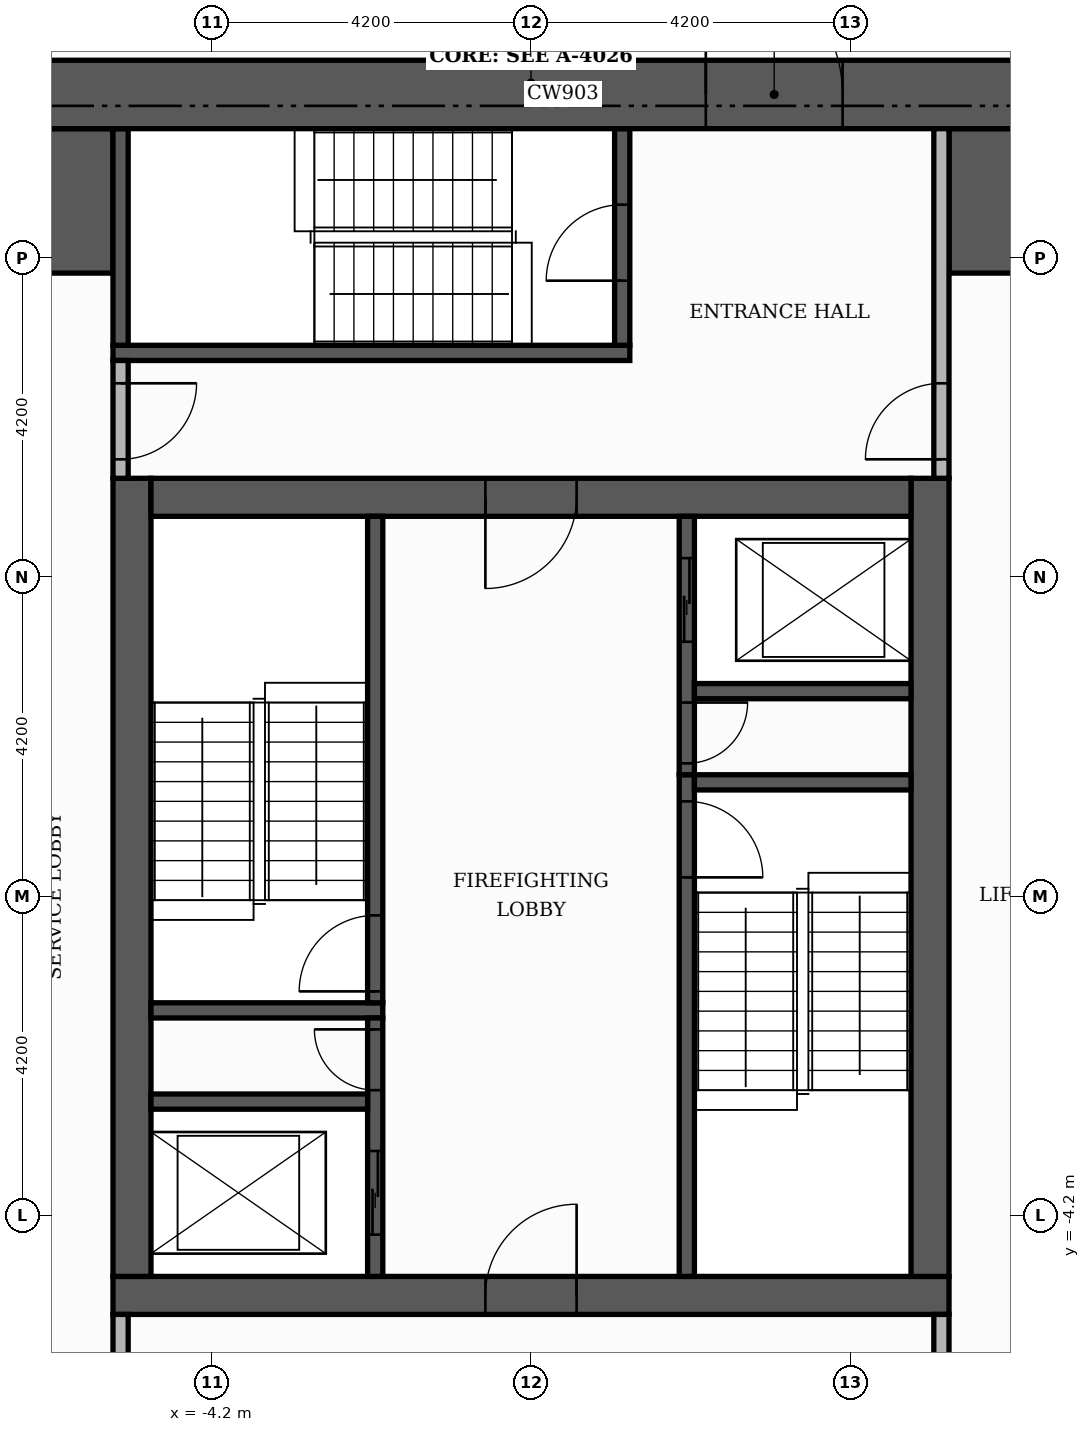
"""IFC4 building model, lengths in metres.
Left out: names, types, materials, properties, quantities, classifications, styles, units other than length and angle.
Written with IfcOpenShell. Run it as: python <this file> out.ifc"""

import sys

from ifc_helpers import new_model, si_unit, direction, frame, frame_2d, origin, place, context, subcontext, project, spatial, rectangle, extrude, element, fill, save


model = new_model("IFC4")
c1 = context("Model", 3, precision=1e-05, world=origin(), true_north=direction((0.0, 1.0)))
c2 = subcontext(c1, "Body", "Model", "MODEL_VIEW")
j1 = project(units=[si_unit("LENGTHUNIT", "METRE"), si_unit("PLANEANGLEUNIT", "RADIAN")], contexts=[c1])
p1 = place(None, origin())
s1 = spatial("IfcSite", under=j1, at=p1, CompositionType="ELEMENT")
p2 = place(p1, origin())
s2 = spatial("IfcBuilding", under=s1, at=p2, CompositionType="ELEMENT")
p3 = place(p2, frame((0.0, 0.0, 161.1)))
s3 = spatial("IfcBuildingStorey", under=s2, at=p3, CompositionType="ELEMENT", Elevation=161.1)
p4 = place(p3, frame((-5.5, -5.25, 0.0), z_axis=(0.0, 0.0, 1.0), x_axis=(1.0, 0.0, 0.0)))
e1 = element("IfcWall", 1, at=p4, inside=s3, PredefinedType="SHEAR", context=c2, shape_type="SweptSolid", body=[
    extrude(rectangle(XDim=11.0, YDim=0.5, at=frame_2d((5.5, 0.0))), origin(), (0.0, 0.0, 1.0), 3.48),
])
p5 = place(p4, frame((4.9, 0.0, 0.0)))
e2 = element("IfcOpeningElement", 2, at=p5, cuts=e1, PredefinedType="OPENING", context=c2, shape_type="SweptSolid", body=[
    extrude(rectangle(XDim=1.2, YDim=2.1, at=frame_2d((0.6, 1.05))), frame((0.0, 0.26, 0.0), z_axis=(0.0, -1.0, 0.0), x_axis=(1.0, 0.0, 0.0)), (0.0, 0.0, 1.0), 0.52),
])
for number, where, z_axis, x_axis in (
    (3, (-5.25, -5.0, 0.0), (0.0, 0.0, 1.0), (0.0, 1.0, 0.0)),
    (4, (5.25, -5.0, 0.0), (0.0, 0.0, 1.0), (0.0, 1.0, 0.0)),
):
    element("IfcWall", number, at=place(p3, frame(where, z_axis=z_axis, x_axis=x_axis)), inside=s3, PredefinedType="SHEAR", context=c2, shape_type="SweptSolid", body=[
        extrude(rectangle(XDim=10.5, YDim=0.5, at=frame_2d((5.25, 0.0))), origin(), (0.0, 0.0, 1.0), 3.48),
    ])
p6 = place(p3, frame((-5.0, 5.25, 0.0), z_axis=(0.0, 0.0, 1.0), x_axis=(1.0, 0.0, 0.0)))
e5 = element("IfcWall", 5, at=p6, inside=s3, PredefinedType="SHEAR", context=c2, shape_type="SweptSolid", body=[
    extrude(rectangle(XDim=10.0, YDim=0.5, at=frame_2d((5.0, 0.0))), origin(), (0.0, 0.0, 1.0), 3.48),
])
p7 = place(p6, frame((4.4, 0.0, 0.0)))
e6 = element("IfcOpeningElement", 6, at=p7, cuts=e5, PredefinedType="OPENING", context=c2, shape_type="SweptSolid", body=[
    extrude(rectangle(XDim=1.2, YDim=2.1, at=frame_2d((0.6, 1.05))), frame((0.0, 0.26, 0.0), z_axis=(0.0, -1.0, 0.0), x_axis=(1.0, 0.0, 0.0)), (0.0, 0.0, 1.0), 0.52),
])
for number, where, z_axis, x_axis in (
    (7, (-10.1, 9.15, 0.0), (0.0, 0.0, 1.0), (1.0, 0.0, 0.0)),
    (8, (5.5, 9.15, 0.0), (0.0, 0.0, 1.0), (1.0, 0.0, 0.0)),
):
    element("IfcWall", number, at=place(p3, frame(where, z_axis=z_axis, x_axis=x_axis)), inside=s3, PredefinedType="SHEAR", context=c2, shape_type="SweptSolid", body=[
        extrude(rectangle(XDim=4.6, YDim=1.9, at=frame_2d((2.3, 0.0))), origin(), (0.0, 0.0, 1.0), 3.48),
    ])
p8 = place(p3, frame((2.05, -5.0, 0.0), z_axis=(0.0, 0.0, 1.0), x_axis=(0.0, 1.0, 0.0)))
e9 = element("IfcWall", 9, at=p8, inside=s3, PredefinedType="SHEAR", context=c2, shape_type="SweptSolid", body=[
    extrude(rectangle(XDim=6.6, YDim=0.2, at=frame_2d((3.3, 0.0))), origin(), (0.0, 0.0, 1.0), 3.48),
])
p9 = place(p8, frame((5.25, 0.0, 0.0)))
e10 = element("IfcOpeningElement", 10, at=p9, cuts=e9, PredefinedType="OPENING", context=c2, shape_type="SweptSolid", body=[
    extrude(rectangle(XDim=1.0, YDim=2.1, at=frame_2d((0.5, 1.05))), frame((0.0, 0.11, 0.0), z_axis=(0.0, -1.0, 0.0), x_axis=(1.0, 0.0, 0.0)), (0.0, 0.0, 1.0), 0.22),
])
p10 = place(p3, frame((-5.0, -1.5, 0.0), z_axis=(0.0, 0.0, 1.0), x_axis=(1.0, 0.0, 0.0)))
e11 = element("IfcWall", 11, at=p10, inside=s3, PredefinedType="SHEAR", context=c2, shape_type="SweptSolid", body=[
    extrude(rectangle(XDim=3.05, YDim=0.2, at=frame_2d((1.525, 0.0))), origin(), (0.0, 0.0, 1.0), 3.48),
])
p11 = place(p3, frame((-2.05, -1.4, 0.0), z_axis=(0.0, 0.0, 1.0), x_axis=(0.0, 1.0, 0.0)))
e12 = element("IfcWall", 12, at=p11, inside=s3, PredefinedType="SHEAR", context=c2, shape_type="SweptSolid", body=[
    extrude(rectangle(XDim=6.4, YDim=0.2, at=frame_2d((3.2, 0.0))), origin(), (0.0, 0.0, 1.0), 3.48),
])
p12 = place(p11, frame((0.15, 0.0, 0.0)))
e13 = element("IfcOpeningElement", 13, at=p12, cuts=e12, PredefinedType="OPENING", context=c2, shape_type="SweptSolid", body=[
    extrude(rectangle(XDim=1.0, YDim=2.1, at=frame_2d((0.5, 1.05))), frame((0.0, 0.11, 0.0), z_axis=(0.0, -1.0, 0.0), x_axis=(1.0, 0.0, 0.0)), (0.0, 0.0, 1.0), 0.22),
])
p13 = place(p3, frame((2.15, 1.5, 0.0), z_axis=(0.0, 0.0, 1.0), x_axis=(1.0, 0.0, 0.0)))
e14 = element("IfcWall", 14, at=p13, inside=s3, PredefinedType="SHEAR", context=c2, shape_type="SweptSolid", body=[
    extrude(rectangle(XDim=2.85, YDim=0.2, at=frame_2d((1.425, 0.0))), origin(), (0.0, 0.0, 1.0), 3.48),
])
p14 = place(p3, frame((-5.5, 7.15, 0.0), z_axis=(0.0, 0.0, 1.0), x_axis=(1.0, 0.0, 0.0)))
e15 = element("IfcWall", 15, at=p14, inside=s3, PredefinedType="SHEAR", context=c2, shape_type="SweptSolid", body=[
    extrude(rectangle(XDim=6.8, YDim=0.2, at=frame_2d((3.4, 0.0))), origin(), (0.0, 0.0, 1.0), 3.48),
])
p15 = place(p3, frame((-5.4, 7.25, 0.0), z_axis=(0.0, 0.0, 1.0), x_axis=(0.0, 1.0, 0.0)))
e16 = element("IfcWall", 16, at=p15, inside=s3, PredefinedType="SHEAR", context=c2, shape_type="SweptSolid", body=[
    extrude(rectangle(XDim=2.85, YDim=0.2, at=frame_2d((1.425, 0.0))), origin(), (0.0, 0.0, 1.0), 3.48),
])
p16 = place(p3, frame((1.2, 7.25, 0.0), z_axis=(0.0, 0.0, 1.0), x_axis=(0.0, 1.0, 0.0)))
e17 = element("IfcWall", 17, at=p16, inside=s3, PredefinedType="SHEAR", context=c2, shape_type="SweptSolid", body=[
    extrude(rectangle(XDim=2.85, YDim=0.2, at=frame_2d((1.425, 0.0))), origin(), (0.0, 0.0, 1.0), 3.48),
])
p17 = place(p16, frame((0.85, 0.0, 0.0)))
e18 = element("IfcOpeningElement", 18, at=p17, cuts=e17, PredefinedType="OPENING", context=c2, shape_type="SweptSolid", body=[
    extrude(rectangle(XDim=1.0, YDim=2.1, at=frame_2d((0.5, 1.05))), frame((0.0, 0.11, 0.0), z_axis=(0.0, -1.0, 0.0), x_axis=(1.0, 0.0, 0.0)), (0.0, 0.0, 1.0), 0.22),
])
p18 = place(p3, frame((-2.05, -5.0, 0.0), z_axis=(0.0, 0.0, 1.0), x_axis=(0.0, 1.0, 0.0)))
e19 = element("IfcWall", 19, at=p18, inside=s3, PredefinedType="SHEAR", context=c2, shape_type="SweptSolid", body=[
    extrude(rectangle(XDim=3.4, YDim=0.2, at=frame_2d((1.7, 0.0))), origin(), (0.0, 0.0, 1.0), 3.48),
])
p19 = place(p18, frame((0.55, 0.0, 0.0)))
e20 = element("IfcOpeningElement", 20, at=p19, cuts=e19, PredefinedType="OPENING", context=c2, shape_type="SweptSolid", body=[
    extrude(rectangle(XDim=1.1, YDim=2.1, at=frame_2d((0.55, 1.05))), frame((0.0, 0.11, 0.0), z_axis=(0.0, -1.0, 0.0), x_axis=(1.0, 0.0, 0.0)), (0.0, 0.0, 1.0), 0.22),
])
p20 = place(p18, frame((2.45, 0.0, 0.0)))
e21 = element("IfcOpeningElement", 21, at=p20, cuts=e19, PredefinedType="OPENING", context=c2, shape_type="SweptSolid", body=[
    extrude(rectangle(XDim=0.8, YDim=2.1, at=frame_2d((0.4, 1.05))), frame((0.0, 0.11, 0.0), z_axis=(0.0, -1.0, 0.0), x_axis=(1.0, 0.0, 0.0)), (0.0, 0.0, 1.0), 0.22),
])
p21 = place(p3, frame((-5.0, -2.7, 0.0), z_axis=(0.0, 0.0, 1.0), x_axis=(1.0, 0.0, 0.0)))
e22 = element("IfcWall", 22, at=p21, inside=s3, PredefinedType="SHEAR", context=c2, shape_type="SweptSolid", body=[
    extrude(rectangle(XDim=2.85, YDim=0.2, at=frame_2d((1.425, 0.0))), origin(), (0.0, 0.0, 1.0), 3.48),
])
p22 = place(p3, frame((2.05, 1.6, 0.0), z_axis=(0.0, 0.0, 1.0), x_axis=(0.0, 1.0, 0.0)))
e23 = element("IfcWall", 23, at=p22, inside=s3, PredefinedType="SHEAR", context=c2, shape_type="SweptSolid", body=[
    extrude(rectangle(XDim=3.4, YDim=0.2, at=frame_2d((1.7, 0.0))), origin(), (0.0, 0.0, 1.0), 3.48),
])
p23 = place(p22, frame((1.75, 0.0, 0.0)))
e24 = element("IfcOpeningElement", 24, at=p23, cuts=e23, PredefinedType="OPENING", context=c2, shape_type="SweptSolid", body=[
    extrude(rectangle(XDim=1.1, YDim=2.1, at=frame_2d((0.55, 1.05))), frame((0.0, 0.11, 0.0), z_axis=(0.0, -1.0, 0.0), x_axis=(1.0, 0.0, 0.0)), (0.0, 0.0, 1.0), 0.22),
])
p24 = place(p22, frame((0.15, 0.0, 0.0)))
e25 = element("IfcOpeningElement", 25, at=p24, cuts=e23, PredefinedType="OPENING", context=c2, shape_type="SweptSolid", body=[
    extrude(rectangle(XDim=0.8, YDim=2.1, at=frame_2d((0.4, 1.05))), frame((0.0, 0.11, 0.0), z_axis=(0.0, -1.0, 0.0), x_axis=(1.0, 0.0, 0.0)), (0.0, 0.0, 1.0), 0.22),
])
p25 = place(p3, frame((2.15, 2.7, 0.0), z_axis=(0.0, 0.0, 1.0), x_axis=(1.0, 0.0, 0.0)))
e26 = element("IfcWall", 26, at=p25, inside=s3, PredefinedType="SHEAR", context=c2, shape_type="SweptSolid", body=[
    extrude(rectangle(XDim=2.85, YDim=0.2, at=frame_2d((1.425, 0.0))), origin(), (0.0, 0.0, 1.0), 3.48),
])
p26 = place(p3, frame((-11.0, 10.55, 0.0), z_axis=(0.0, 0.0, 1.0), x_axis=(1.0, 0.0, 0.0)))
e27 = element("IfcWall", 27, at=p26, inside=s3, PredefinedType="SHEAR", context=c2, shape_type="SweptSolid", body=[
    extrude(rectangle(XDim=22.0, YDim=0.9, at=frame_2d((11.0, 0.0))), origin(), (0.0, 0.0, 1.0), 3.48),
])
p27 = place(p26, frame((13.3, 0.0, 0.0)))
e28 = element("IfcOpeningElement", 28, at=p27, cuts=e27, PredefinedType="OPENING", context=c2, shape_type="SweptSolid", body=[
    extrude(rectangle(XDim=1.8, YDim=2.2, at=frame_2d((0.9, 1.1))), frame((0.0, 0.46, 0.0), z_axis=(0.0, -1.0, 0.0), x_axis=(1.0, 0.0, 0.0)), (0.0, 0.0, 1.0), 0.92),
])
p28 = place(p3, frame((-5.4, -10.1, 0.0), z_axis=(0.0, 0.0, 1.0), x_axis=(0.0, 1.0, 0.0)))
e29 = element("IfcWall", 29, at=p28, inside=s3, PredefinedType="PARTITIONING", context=c2, shape_type="SweptSolid", body=[
    extrude(rectangle(XDim=4.6, YDim=0.2, at=frame_2d((2.3, 0.0))), origin(), (0.0, 0.0, 1.0), 3.48),
])
p29 = place(p28, frame((2.9, 0.0, 0.0)))
e30 = element("IfcOpeningElement", 30, at=p29, cuts=e29, PredefinedType="OPENING", context=c2, shape_type="SweptSolid", body=[
    extrude(rectangle(XDim=1.0, YDim=2.1, at=frame_2d((0.5, 1.05))), frame((0.0, 0.11, 0.0), z_axis=(0.0, -1.0, 0.0), x_axis=(1.0, 0.0, 0.0)), (0.0, 0.0, 1.0), 0.22),
])
p30 = place(p3, frame((5.4, -10.1, 0.0), z_axis=(0.0, 0.0, 1.0), x_axis=(0.0, 1.0, 0.0)))
e31 = element("IfcWall", 31, at=p30, inside=s3, PredefinedType="PARTITIONING", context=c2, shape_type="SweptSolid", body=[
    extrude(rectangle(XDim=4.6, YDim=0.2, at=frame_2d((2.3, 0.0))), origin(), (0.0, 0.0, 1.0), 3.48),
])
p31 = place(p30, frame((2.9, 0.0, 0.0)))
e32 = element("IfcOpeningElement", 32, at=p31, cuts=e31, PredefinedType="OPENING", context=c2, shape_type="SweptSolid", body=[
    extrude(rectangle(XDim=1.0, YDim=2.1, at=frame_2d((0.5, 1.05))), frame((0.0, 0.11, 0.0), z_axis=(0.0, -1.0, 0.0), x_axis=(1.0, 0.0, 0.0)), (0.0, 0.0, 1.0), 0.22),
])
p32 = place(p3, frame((-5.4, 5.5, 0.0), z_axis=(0.0, 0.0, 1.0), x_axis=(0.0, 1.0, 0.0)))
e33 = element("IfcWall", 33, at=p32, inside=s3, PredefinedType="PARTITIONING", context=c2, shape_type="SweptSolid", body=[
    extrude(rectangle(XDim=1.55, YDim=0.2, at=frame_2d((0.775, 0.0))), origin(), (0.0, 0.0, 1.0), 3.48),
])
p33 = place(p32, frame((0.25, 0.0, 0.0)))
e34 = element("IfcOpeningElement", 34, at=p33, cuts=e33, PredefinedType="OPENING", context=c2, shape_type="SweptSolid", body=[
    extrude(rectangle(XDim=1.0, YDim=2.1, at=frame_2d((0.5, 1.05))), frame((0.0, 0.11, 0.0), z_axis=(0.0, -1.0, 0.0), x_axis=(1.0, 0.0, 0.0)), (0.0, 0.0, 1.0), 0.22),
])
p34 = place(p3, frame((5.4, 5.5, 0.0), z_axis=(0.0, 0.0, 1.0), x_axis=(0.0, 1.0, 0.0)))
e35 = element("IfcWall", 35, at=p34, inside=s3, PredefinedType="PARTITIONING", context=c2, shape_type="SweptSolid", body=[
    extrude(rectangle(XDim=4.6, YDim=0.2, at=frame_2d((2.3, 0.0))), origin(), (0.0, 0.0, 1.0), 3.48),
])
p35 = place(p34, frame((0.25, 0.0, 0.0)))
e36 = element("IfcOpeningElement", 36, at=p35, cuts=e35, PredefinedType="OPENING", context=c2, shape_type="SweptSolid", body=[
    extrude(rectangle(XDim=1.0, YDim=2.1, at=frame_2d((0.5, 1.05))), frame((0.0, 0.11, 0.0), z_axis=(0.0, -1.0, 0.0), x_axis=(1.0, 0.0, 0.0)), (0.0, 0.0, 1.0), 0.22),
])
p36 = place(p23, origin())
e37 = element("IfcDoor", 37, at=p36, inside=s3, OperationType="SLIDING_TO_LEFT", PredefinedType="DOOR", context=c2, shape_type="SweptSolid", body=[
    extrude(rectangle(XDim=1.1, YDim=2.1, at=frame_2d((0.55, 1.05))), frame((0.0, 0.025, 0.0), z_axis=(0.0, -1.0, 0.0), x_axis=(1.0, 0.0, 0.0)), (0.0, 0.0, 1.0), 0.05),
])
fill(e24, e37)
p37 = place(p19, origin())
e38 = element("IfcDoor", 38, at=p37, inside=s3, OperationType="SLIDING_TO_LEFT", PredefinedType="DOOR", context=c2, shape_type="SweptSolid", body=[
    extrude(rectangle(XDim=1.1, YDim=2.1, at=frame_2d((0.55, 1.05))), frame((0.0, 0.025, 0.0), z_axis=(0.0, -1.0, 0.0), x_axis=(1.0, 0.0, 0.0)), (0.0, 0.0, 1.0), 0.05),
])
fill(e20, e38)
p38 = place(p12, origin())
e39 = element("IfcDoor", 39, at=p38, inside=s3, OperationType="SINGLE_SWING_LEFT", PredefinedType="DOOR", context=c2, shape_type="SweptSolid", body=[
    extrude(rectangle(XDim=1.0, YDim=2.1, at=frame_2d((0.5, 1.05))), frame((0.0, 0.025, 0.0), z_axis=(0.0, -1.0, 0.0), x_axis=(1.0, 0.0, 0.0)), (0.0, 0.0, 1.0), 0.05),
])
fill(e13, e39)
p39 = place(p9, frame((1.0, 0.0, 0.0), z_axis=(0.0, 0.0, 1.0), x_axis=(-1.0, 0.0, 0.0)))
e40 = element("IfcDoor", 40, at=p39, inside=s3, OperationType="SINGLE_SWING_LEFT", PredefinedType="DOOR", context=c2, shape_type="SweptSolid", body=[
    extrude(rectangle(XDim=1.0, YDim=2.1, at=frame_2d((0.5, 1.05))), frame((0.0, 0.025, 0.0), z_axis=(0.0, -1.0, 0.0), x_axis=(1.0, 0.0, 0.0)), (0.0, 0.0, 1.0), 0.05),
])
fill(e10, e40)
p40 = place(p24, frame((0.8, 0.0, 0.0), z_axis=(0.0, 0.0, 1.0), x_axis=(-1.0, 0.0, 0.0)))
e41 = element("IfcDoor", 41, at=p40, inside=s3, OperationType="SINGLE_SWING_RIGHT", PredefinedType="DOOR", context=c2, shape_type="SweptSolid", body=[
    extrude(rectangle(XDim=0.8, YDim=2.1, at=frame_2d((0.4, 1.05))), frame((0.0, 0.025, 0.0), z_axis=(0.0, -1.0, 0.0), x_axis=(1.0, 0.0, 0.0)), (0.0, 0.0, 1.0), 0.05),
])
fill(e25, e41)
p41 = place(p20, origin())
e42 = element("IfcDoor", 42, at=p41, inside=s3, OperationType="SINGLE_SWING_RIGHT", PredefinedType="DOOR", context=c2, shape_type="SweptSolid", body=[
    extrude(rectangle(XDim=0.8, YDim=2.1, at=frame_2d((0.4, 1.05))), frame((0.0, 0.025, 0.0), z_axis=(0.0, -1.0, 0.0), x_axis=(1.0, 0.0, 0.0)), (0.0, 0.0, 1.0), 0.05),
])
fill(e21, e42)
p42 = place(p7, frame((1.2, 0.0, 0.0), z_axis=(0.0, 0.0, 1.0), x_axis=(-1.0, 0.0, 0.0)))
e43 = element("IfcDoor", 43, at=p42, inside=s3, OperationType="SINGLE_SWING_LEFT", PredefinedType="DOOR", context=c2, shape_type="SweptSolid", body=[
    extrude(rectangle(XDim=1.2, YDim=2.1, at=frame_2d((0.6, 1.05))), frame((0.0, 0.025, 0.0), z_axis=(0.0, -1.0, 0.0), x_axis=(1.0, 0.0, 0.0)), (0.0, 0.0, 1.0), 0.05),
])
fill(e6, e43)
p43 = place(p5, origin())
e44 = element("IfcDoor", 44, at=p43, inside=s3, OperationType="SINGLE_SWING_RIGHT", PredefinedType="DOOR", context=c2, shape_type="SweptSolid", body=[
    extrude(rectangle(XDim=1.2, YDim=2.1, at=frame_2d((0.6, 1.05))), frame((0.0, 0.025, 0.0), z_axis=(0.0, -1.0, 0.0), x_axis=(1.0, 0.0, 0.0)), (0.0, 0.0, 1.0), 0.05),
])
fill(e2, e44)
p44 = place(p17, origin())
e45 = element("IfcDoor", 45, at=p44, inside=s3, OperationType="SINGLE_SWING_LEFT", PredefinedType="DOOR", context=c2, shape_type="SweptSolid", body=[
    extrude(rectangle(XDim=1.0, YDim=2.1, at=frame_2d((0.5, 1.05))), frame((0.0, 0.025, 0.0), z_axis=(0.0, -1.0, 0.0), x_axis=(1.0, 0.0, 0.0)), (0.0, 0.0, 1.0), 0.05),
])
fill(e18, e45)
p45 = place(p33, frame((1.0, 0.0, 0.0), z_axis=(0.0, 0.0, 1.0), x_axis=(-1.0, 0.0, 0.0)))
e46 = element("IfcDoor", 46, at=p45, inside=s3, OperationType="SINGLE_SWING_RIGHT", PredefinedType="DOOR", context=c2, shape_type="SweptSolid", body=[
    extrude(rectangle(XDim=1.0, YDim=2.1, at=frame_2d((0.5, 1.05))), frame((0.0, 0.025, 0.0), z_axis=(0.0, -1.0, 0.0), x_axis=(1.0, 0.0, 0.0)), (0.0, 0.0, 1.0), 0.05),
])
fill(e34, e46)
p46 = place(p35, origin())
e47 = element("IfcDoor", 47, at=p46, inside=s3, OperationType="SINGLE_SWING_LEFT", PredefinedType="DOOR", context=c2, shape_type="SweptSolid", body=[
    extrude(rectangle(XDim=1.0, YDim=2.1, at=frame_2d((0.5, 1.05))), frame((0.0, 0.025, 0.0), z_axis=(0.0, -1.0, 0.0), x_axis=(1.0, 0.0, 0.0)), (0.0, 0.0, 1.0), 0.05),
])
fill(e36, e47)
p47 = place(p27, origin())
e48 = element("IfcDoor", 48, at=p47, inside=s3, OperationType="DOUBLE_DOOR_SINGLE_SWING", PredefinedType="DOOR", context=c2, shape_type="SweptSolid", body=[
    extrude(rectangle(XDim=1.8, YDim=2.2, at=frame_2d((0.9, 1.1))), frame((0.0, 0.025, 0.0), z_axis=(0.0, -1.0, 0.0), x_axis=(1.0, 0.0, 0.0)), (0.0, 0.0, 1.0), 0.05),
])
fill(e28, e48)
save(model, sys.argv[1])
